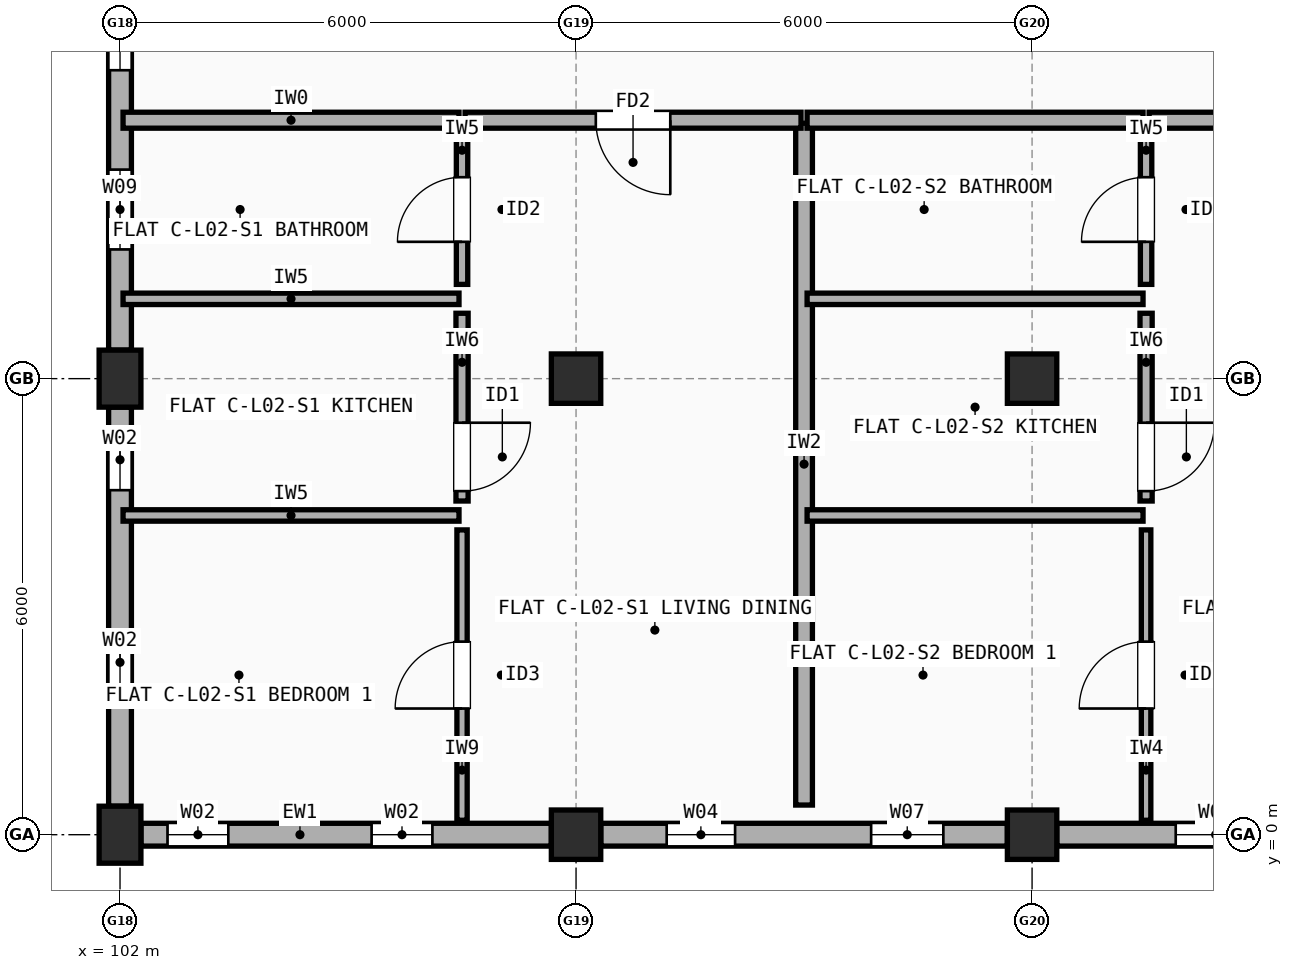
"""IFC4 building model, lengths in metres.
Left out: names, types, materials, properties, quantities, classifications, styles, units other than length and angle.
Written with IfcOpenShell. Run it as: python <this file> out.ifc"""

import sys

from ifc_helpers import new_model, si_unit, direction, frame, frame_2d, origin, origin_2d, place, context, subcontext, project, spatial, rectangle, extrude, element, fill, save


model = new_model("IFC4")
c1 = context("Model", 3, precision=1e-05, world=origin(), true_north=direction((0.0, 1.0)))
c2 = subcontext(c1, "Body", "Model", "MODEL_VIEW")
j1 = project(units=[si_unit("LENGTHUNIT", "METRE"), si_unit("PLANEANGLEUNIT", "RADIAN")], contexts=[c1])
p1 = place(None, origin())
s1 = spatial("IfcSite", under=j1, at=p1, CompositionType="ELEMENT")
p2 = place(p1, origin())
s2 = spatial("IfcBuilding", under=s1, at=p2, CompositionType="ELEMENT")
p3 = place(p2, frame((0.0, 0.0, 7.7)))
s3 = spatial("IfcBuildingStorey", under=s2, at=p3, CompositionType="ELEMENT", Elevation=7.7)
for number, where, z_axis, x_axis in (
    (1, (102.0, 0.0, 0.0), (0.0, 0.0, 1.0), (1.0, 0.0, 0.0)),
    (2, (102.0, 6.0, 0.0), (0.0, 0.0, 1.0), (1.0, 0.0, 0.0)),
):
    element("IfcColumn", number, at=place(p3, frame(where, z_axis=z_axis, x_axis=x_axis)), inside=s3, PredefinedType="COLUMN", context=c2, shape_type="SweptSolid", body=[
        extrude(rectangle(XDim=0.55, YDim=0.75, at=origin_2d()), origin(), (0.0, 0.0, 1.0), 2.955),
    ])
for number, where, z_axis, x_axis in (
    (3, (108.0, 0.0, 0.0), (0.0, 0.0, 1.0), (1.0, 0.0, 0.0)),
    (4, (108.0, 6.0, 0.0), (0.0, 0.0, 1.0), (1.0, 0.0, 0.0)),
    (5, (114.0, 0.0, 0.0), (0.0, 0.0, 1.0), (1.0, 0.0, 0.0)),
    (6, (114.0, 6.0, 0.0), (0.0, 0.0, 1.0), (1.0, 0.0, 0.0)),
):
    element("IfcColumn", number, at=place(p3, frame(where, z_axis=z_axis, x_axis=x_axis)), inside=s3, PredefinedType="COLUMN", context=c2, shape_type="SweptSolid", body=[
        extrude(rectangle(XDim=0.65, YDim=0.65, at=origin_2d()), origin(), (0.0, 0.0, 1.0), 2.955),
    ])
p4 = place(p3, frame((102.275, 0.0, 0.0), z_axis=(0.0, 0.0, 1.0), x_axis=(1.0, 0.0, 0.0)))
e7 = element("IfcWall", 7, at=p4, inside=s3, PredefinedType="STANDARD", context=c2, shape_type="SweptSolid", body=[
    extrude(rectangle(XDim=5.4, YDim=0.3, at=frame_2d((2.7, 0.0))), origin(), (0.0, 0.0, 1.0), 2.437),
])
p5 = place(p4, frame((0.35, 0.0, 0.9)))
e8 = element("IfcOpeningElement", 8, at=p5, cuts=e7, PredefinedType="OPENING", context=c2, shape_type="SweptSolid", body=[
    extrude(rectangle(XDim=0.8, YDim=1.2, at=frame_2d((0.4, 0.6))), frame((0.0, 0.16, 0.0), z_axis=(0.0, -1.0, 0.0), x_axis=(1.0, 0.0, 0.0)), (0.0, 0.0, 1.0), 0.32),
])
p6 = place(p4, frame((3.035, 0.0, 0.9)))
e9 = element("IfcOpeningElement", 9, at=p6, cuts=e7, PredefinedType="OPENING", context=c2, shape_type="SweptSolid", body=[
    extrude(rectangle(XDim=0.8, YDim=1.2, at=frame_2d((0.4, 0.6))), frame((0.0, 0.16, 0.0), z_axis=(0.0, -1.0, 0.0), x_axis=(1.0, 0.0, 0.0)), (0.0, 0.0, 1.0), 0.32),
])
p7 = place(p3, frame((108.325, 0.0, 0.0), z_axis=(0.0, 0.0, 1.0), x_axis=(1.0, 0.0, 0.0)))
e10 = element("IfcWall", 10, at=p7, inside=s3, PredefinedType="STANDARD", context=c2, shape_type="SweptSolid", body=[
    extrude(rectangle(XDim=5.35, YDim=0.3, at=frame_2d((2.675, 0.0))), origin(), (0.0, 0.0, 1.0), 2.437),
])
p8 = place(p7, frame((0.867, 0.0, 0.9)))
e11 = element("IfcOpeningElement", 11, at=p8, cuts=e10, PredefinedType="OPENING", context=c2, shape_type="SweptSolid", body=[
    extrude(rectangle(XDim=0.9, YDim=1.3, at=frame_2d((0.45, 0.65))), frame((0.0, 0.16, 0.0), z_axis=(0.0, -1.0, 0.0), x_axis=(1.0, 0.0, 0.0)), (0.0, 0.0, 1.0), 0.32),
])
p9 = place(p7, frame((3.558, 0.0, 0.9)))
e12 = element("IfcOpeningElement", 12, at=p9, cuts=e10, PredefinedType="OPENING", context=c2, shape_type="SweptSolid", body=[
    extrude(rectangle(XDim=0.95, YDim=1.35, at=frame_2d((0.475, 0.675))), frame((0.0, 0.16, 0.0), z_axis=(0.0, -1.0, 0.0), x_axis=(1.0, 0.0, 0.0)), (0.0, 0.0, 1.0), 0.32),
])
p10 = place(p3, frame((114.325, 0.0, 0.0), z_axis=(0.0, 0.0, 1.0), x_axis=(1.0, 0.0, 0.0)))
e13 = element("IfcWall", 13, at=p10, inside=s3, PredefinedType="STANDARD", context=c2, shape_type="SweptSolid", body=[
    extrude(rectangle(XDim=5.35, YDim=0.3, at=frame_2d((2.675, 0.0))), origin(), (0.0, 0.0, 1.0), 2.437),
])
p11 = place(p10, frame((1.565, 0.0, 0.9)))
e14 = element("IfcOpeningElement", 14, at=p11, cuts=e13, PredefinedType="OPENING", context=c2, shape_type="SweptSolid", body=[
    extrude(rectangle(XDim=1.05, YDim=1.35, at=frame_2d((0.525, 0.675))), frame((0.0, 0.16, 0.0), z_axis=(0.0, -1.0, 0.0), x_axis=(1.0, 0.0, 0.0)), (0.0, 0.0, 1.0), 0.32),
])
p12 = place(p10, frame((3.95, 0.0, 0.9)))
e15 = element("IfcOpeningElement", 15, at=p12, cuts=e13, PredefinedType="OPENING", context=c2, shape_type="SweptSolid", body=[
    extrude(rectangle(XDim=1.05, YDim=1.35, at=frame_2d((0.525, 0.675))), frame((0.0, 0.16, 0.0), z_axis=(0.0, -1.0, 0.0), x_axis=(1.0, 0.0, 0.0)), (0.0, 0.0, 1.0), 0.32),
])
p13 = place(p3, frame((102.0, 11.625, 0.0), z_axis=(0.0, 0.0, 1.0), x_axis=(0.0, -1.0, 0.0)))
e16 = element("IfcWall", 16, at=p13, inside=s3, PredefinedType="STANDARD", context=c2, shape_type="SweptSolid", body=[
    extrude(rectangle(XDim=5.25, YDim=0.3, at=frame_2d((2.625, 0.0))), origin(), (0.0, 0.0, 1.0), 2.437),
])
p14 = place(p13, frame((0.617, 0.0, 0.9)))
e17 = element("IfcOpeningElement", 17, at=p14, cuts=e16, PredefinedType="OPENING", context=c2, shape_type="SweptSolid", body=[
    extrude(rectangle(XDim=0.95, YDim=1.35, at=frame_2d((0.475, 0.675))), frame((0.0, 0.16, 0.0), z_axis=(0.0, -1.0, 0.0), x_axis=(1.0, 0.0, 0.0)), (0.0, 0.0, 1.0), 0.32),
])
p15 = place(p13, frame((2.875, 0.0, 0.9)))
e18 = element("IfcOpeningElement", 18, at=p15, cuts=e16, PredefinedType="OPENING", context=c2, shape_type="SweptSolid", body=[
    extrude(rectangle(XDim=1.05, YDim=1.35, at=frame_2d((0.525, 0.675))), frame((0.0, 0.16, 0.0), z_axis=(0.0, -1.0, 0.0), x_axis=(1.0, 0.0, 0.0)), (0.0, 0.0, 1.0), 0.32),
])
p16 = place(p3, frame((102.0, 5.625, 0.0), z_axis=(0.0, 0.0, 1.0), x_axis=(0.0, -1.0, 0.0)))
e19 = element("IfcWall", 19, at=p16, inside=s3, PredefinedType="STANDARD", context=c2, shape_type="SweptSolid", body=[
    extrude(rectangle(XDim=5.25, YDim=0.3, at=frame_2d((2.625, 0.0))), origin(), (0.0, 0.0, 1.0), 2.437),
])
p17 = place(p16, frame((0.292, 0.0, 0.9)))
e20 = element("IfcOpeningElement", 20, at=p17, cuts=e19, PredefinedType="OPENING", context=c2, shape_type="SweptSolid", body=[
    extrude(rectangle(XDim=0.8, YDim=1.2, at=frame_2d((0.4, 0.6))), frame((0.0, 0.16, 0.0), z_axis=(0.0, -1.0, 0.0), x_axis=(1.0, 0.0, 0.0)), (0.0, 0.0, 1.0), 0.32),
])
p18 = place(p16, frame((2.958, 0.0, 0.9)))
e21 = element("IfcOpeningElement", 21, at=p18, cuts=e19, PredefinedType="OPENING", context=c2, shape_type="SweptSolid", body=[
    extrude(rectangle(XDim=0.8, YDim=1.2, at=frame_2d((0.4, 0.6))), frame((0.0, 0.16, 0.0), z_axis=(0.0, -1.0, 0.0), x_axis=(1.0, 0.0, 0.0)), (0.0, 0.0, 1.0), 0.32),
])
p19 = place(p3, frame((111.0, 0.39, 0.0), z_axis=(0.0, 0.0, 1.0), x_axis=(0.0, 1.0, 0.0)))
e22 = element("IfcWall", 22, at=p19, inside=s3, PredefinedType="SOLIDWALL", context=c2, shape_type="SweptSolid", body=[
    extrude(rectangle(XDim=8.97, YDim=0.22, at=frame_2d((4.485, 0.0))), origin(), (0.0, 0.0, 1.0), 2.437),
])
p20 = place(p3, frame((102.04, 9.4, 0.0), z_axis=(0.0, 0.0, 1.0), x_axis=(1.0, 0.0, 0.0)))
e23 = element("IfcWall", 23, at=p20, inside=s3, PredefinedType="SOLIDWALL", context=c2, shape_type="SweptSolid", body=[
    extrude(rectangle(XDim=4.42, YDim=0.21, at=frame_2d((2.21, 0.0))), origin(), (0.0, 0.0, 1.0), 2.437),
])
p21 = place(p3, frame((106.54, 9.4, 0.0), z_axis=(0.0, 0.0, 1.0), x_axis=(1.0, 0.0, 0.0)))
e24 = element("IfcWall", 24, at=p21, inside=s3, PredefinedType="SOLIDWALL", context=c2, shape_type="SweptSolid", body=[
    extrude(rectangle(XDim=4.42, YDim=0.21, at=frame_2d((2.21, 0.0))), origin(), (0.0, 0.0, 1.0), 2.337),
])
p22 = place(p21, frame((1.72, 0.0, 0.0)))
e25 = element("IfcOpeningElement", 25, at=p22, cuts=e24, PredefinedType="OPENING", context=c2, shape_type="SweptSolid", body=[
    extrude(rectangle(XDim=0.98, YDim=2.15, at=frame_2d((0.49, 1.075))), frame((0.0, 0.115, 0.0), z_axis=(0.0, -1.0, 0.0), x_axis=(1.0, 0.0, 0.0)), (0.0, 0.0, 1.0), 0.23),
])
p23 = place(p3, frame((106.5, 0.19, 0.0), z_axis=(0.0, 0.0, 1.0), x_axis=(0.0, 1.0, 0.0)))
e26 = element("IfcWall", 26, at=p23, inside=s3, PredefinedType="PARTITIONING", context=c2, shape_type="SweptSolid", body=[
    extrude(rectangle(XDim=3.82, YDim=0.135, at=frame_2d((1.91, 0.0))), origin(), (0.0, 0.0, 1.0), 2.955),
])
p24 = place(p23, frame((1.47, 0.0, 0.0)))
e27 = element("IfcOpeningElement", 27, at=p24, cuts=e26, PredefinedType="OPENING", context=c2, shape_type="SweptSolid", body=[
    extrude(rectangle(XDim=0.88, YDim=2.1, at=frame_2d((0.44, 1.05))), frame((0.0, 0.077, 0.0), z_axis=(0.0, -1.0, 0.0), x_axis=(1.0, 0.0, 0.0)), (0.0, 0.0, 1.0), 0.155),
])
p25 = place(p3, frame((106.5, 4.39, 0.0), z_axis=(0.0, 0.0, 1.0), x_axis=(0.0, 1.0, 0.0)))
e28 = element("IfcWall", 28, at=p25, inside=s3, PredefinedType="PLUMBINGWALL", context=c2, shape_type="SweptSolid", body=[
    extrude(rectangle(XDim=2.47, YDim=0.16, at=frame_2d((1.235, 0.0))), origin(), (0.0, 0.0, 1.0), 2.437),
])
p26 = place(p25, frame((0.13, 0.0, 0.0)))
e29 = element("IfcOpeningElement", 29, at=p26, cuts=e28, PredefinedType="OPENING", context=c2, shape_type="SweptSolid", body=[
    extrude(rectangle(XDim=0.9, YDim=2.1, at=frame_2d((0.45, 1.05))), frame((0.0, 0.09, 0.0), z_axis=(0.0, -1.0, 0.0), x_axis=(1.0, 0.0, 0.0)), (0.0, 0.0, 1.0), 0.18),
])
p27 = place(p3, frame((106.5, 7.24, 0.0), z_axis=(0.0, 0.0, 1.0), x_axis=(0.0, 1.0, 0.0)))
e30 = element("IfcWall", 30, at=p27, inside=s3, PredefinedType="PARTITIONING", context=c2, shape_type="SweptSolid", body=[
    extrude(rectangle(XDim=1.97, YDim=0.15, at=frame_2d((0.985, 0.0))), origin(), (0.0, 0.0, 1.0), 2.955),
])
p28 = place(p27, frame((0.56, 0.0, 0.0)))
e31 = element("IfcOpeningElement", 31, at=p28, cuts=e30, PredefinedType="OPENING", context=c2, shape_type="SweptSolid", body=[
    extrude(rectangle(XDim=0.85, YDim=2.1, at=frame_2d((0.425, 1.05))), frame((0.0, 0.085, 0.0), z_axis=(0.0, -1.0, 0.0), x_axis=(1.0, 0.0, 0.0)), (0.0, 0.0, 1.0), 0.17),
])
for number, where, z_axis, x_axis in (
    (32, (102.04, 4.2, 0.0), (0.0, 0.0, 1.0), (1.0, 0.0, 0.0)),
    (33, (102.04, 7.05, 0.0), (0.0, 0.0, 1.0), (1.0, 0.0, 0.0)),
):
    element("IfcWall", number, at=place(p3, frame(where, z_axis=z_axis, x_axis=x_axis)), inside=s3, PredefinedType="PARTITIONING", context=c2, shape_type="SweptSolid", body=[
        extrude(rectangle(XDim=4.42, YDim=0.15, at=frame_2d((2.21, 0.0))), origin(), (0.0, 0.0, 1.0), 2.437),
    ])
p29 = place(p3, frame((111.04, 9.4, 0.0), z_axis=(0.0, 0.0, 1.0), x_axis=(1.0, 0.0, 0.0)))
e34 = element("IfcWall", 34, at=p29, inside=s3, PredefinedType="SOLIDWALL", context=c2, shape_type="SweptSolid", body=[
    extrude(rectangle(XDim=4.42, YDim=0.21, at=frame_2d((2.21, 0.0))), origin(), (0.0, 0.0, 1.0), 2.337),
])
p30 = place(p3, frame((115.54, 9.4, 0.0), z_axis=(0.0, 0.0, 1.0), x_axis=(1.0, 0.0, 0.0)))
e35 = element("IfcWall", 35, at=p30, inside=s3, PredefinedType="SOLIDWALL", context=c2, shape_type="SweptSolid", body=[
    extrude(rectangle(XDim=4.42, YDim=0.21, at=frame_2d((2.21, 0.0))), origin(), (0.0, 0.0, 1.0), 2.337),
])
p31 = place(p30, frame((1.685, 0.0, 0.0)))
e36 = element("IfcOpeningElement", 36, at=p31, cuts=e35, PredefinedType="OPENING", context=c2, shape_type="SweptSolid", body=[
    extrude(rectangle(XDim=1.05, YDim=2.15, at=frame_2d((0.525, 1.075))), frame((0.0, 0.115, 0.0), z_axis=(0.0, -1.0, 0.0), x_axis=(1.0, 0.0, 0.0)), (0.0, 0.0, 1.0), 0.23),
])
p32 = place(p3, frame((115.5, 0.19, 0.0), z_axis=(0.0, 0.0, 1.0), x_axis=(0.0, 1.0, 0.0)))
e37 = element("IfcWall", 37, at=p32, inside=s3, PredefinedType="PARTITIONING", context=c2, shape_type="SweptSolid", body=[
    extrude(rectangle(XDim=3.82, YDim=0.125, at=frame_2d((1.91, 0.0))), origin(), (0.0, 0.0, 1.0), 2.955),
])
p33 = place(p32, frame((1.47, 0.0, 0.0)))
e38 = element("IfcOpeningElement", 38, at=p33, cuts=e37, PredefinedType="OPENING", context=c2, shape_type="SweptSolid", body=[
    extrude(rectangle(XDim=0.88, YDim=2.1, at=frame_2d((0.44, 1.05))), frame((0.0, 0.073, 0.0), z_axis=(0.0, -1.0, 0.0), x_axis=(1.0, 0.0, 0.0)), (0.0, 0.0, 1.0), 0.145),
])
p34 = place(p3, frame((115.5, 4.39, 0.0), z_axis=(0.0, 0.0, 1.0), x_axis=(0.0, 1.0, 0.0)))
e39 = element("IfcWall", 39, at=p34, inside=s3, PredefinedType="PLUMBINGWALL", context=c2, shape_type="SweptSolid", body=[
    extrude(rectangle(XDim=2.47, YDim=0.16, at=frame_2d((1.235, 0.0))), origin(), (0.0, 0.0, 1.0), 2.437),
])
p35 = place(p34, frame((0.13, 0.0, 0.0)))
e40 = element("IfcOpeningElement", 40, at=p35, cuts=e39, PredefinedType="OPENING", context=c2, shape_type="SweptSolid", body=[
    extrude(rectangle(XDim=0.9, YDim=2.1, at=frame_2d((0.45, 1.05))), frame((0.0, 0.09, 0.0), z_axis=(0.0, -1.0, 0.0), x_axis=(1.0, 0.0, 0.0)), (0.0, 0.0, 1.0), 0.18),
])
p36 = place(p3, frame((115.5, 7.24, 0.0), z_axis=(0.0, 0.0, 1.0), x_axis=(0.0, 1.0, 0.0)))
e41 = element("IfcWall", 41, at=p36, inside=s3, PredefinedType="PARTITIONING", context=c2, shape_type="SweptSolid", body=[
    extrude(rectangle(XDim=1.97, YDim=0.15, at=frame_2d((0.985, 0.0))), origin(), (0.0, 0.0, 1.0), 2.955),
])
p37 = place(p36, frame((0.56, 0.0, 0.0)))
e42 = element("IfcOpeningElement", 42, at=p37, cuts=e41, PredefinedType="OPENING", context=c2, shape_type="SweptSolid", body=[
    extrude(rectangle(XDim=0.85, YDim=2.1, at=frame_2d((0.425, 1.05))), frame((0.0, 0.085, 0.0), z_axis=(0.0, -1.0, 0.0), x_axis=(1.0, 0.0, 0.0)), (0.0, 0.0, 1.0), 0.17),
])
for number, where, z_axis, x_axis in (
    (43, (111.04, 4.2, 0.0), (0.0, 0.0, 1.0), (1.0, 0.0, 0.0)),
    (44, (111.04, 7.05, 0.0), (0.0, 0.0, 1.0), (1.0, 0.0, 0.0)),
):
    element("IfcWall", number, at=place(p3, frame(where, z_axis=z_axis, x_axis=x_axis)), inside=s3, PredefinedType="PARTITIONING", context=c2, shape_type="SweptSolid", body=[
        extrude(rectangle(XDim=4.42, YDim=0.15, at=frame_2d((2.21, 0.0))), origin(), (0.0, 0.0, 1.0), 2.337),
    ])
p38 = place(p5, origin())
e45 = element("IfcWindow", 45, at=p38, inside=s3, PartitioningType="SINGLE_PANEL", PredefinedType="WINDOW", context=c2, shape_type="SweptSolid", body=[
    extrude(rectangle(XDim=0.8, YDim=1.2, at=frame_2d((0.4, 0.6))), frame((0.0, 0.03, 0.0), z_axis=(0.0, -1.0, 0.0), x_axis=(1.0, 0.0, 0.0)), (0.0, 0.0, 1.0), 0.06),
])
fill(e8, e45)
p39 = place(p6, origin())
e46 = element("IfcWindow", 46, at=p39, inside=s3, PartitioningType="SINGLE_PANEL", PredefinedType="WINDOW", context=c2, shape_type="SweptSolid", body=[
    extrude(rectangle(XDim=0.8, YDim=1.2, at=frame_2d((0.4, 0.6))), frame((0.0, 0.03, 0.0), z_axis=(0.0, -1.0, 0.0), x_axis=(1.0, 0.0, 0.0)), (0.0, 0.0, 1.0), 0.06),
])
fill(e9, e46)
p40 = place(p8, origin())
e47 = element("IfcWindow", 47, at=p40, inside=s3, PartitioningType="SINGLE_PANEL", PredefinedType="WINDOW", context=c2, shape_type="SweptSolid", body=[
    extrude(rectangle(XDim=0.9, YDim=1.3, at=frame_2d((0.45, 0.65))), frame((0.0, 0.03, 0.0), z_axis=(0.0, -1.0, 0.0), x_axis=(1.0, 0.0, 0.0)), (0.0, 0.0, 1.0), 0.06),
])
fill(e11, e47)
p41 = place(p9, origin())
e48 = element("IfcWindow", 48, at=p41, inside=s3, PartitioningType="SINGLE_PANEL", PredefinedType="WINDOW", context=c2, shape_type="SweptSolid", body=[
    extrude(rectangle(XDim=0.95, YDim=1.35, at=frame_2d((0.475, 0.675))), frame((0.0, 0.03, 0.0), z_axis=(0.0, -1.0, 0.0), x_axis=(1.0, 0.0, 0.0)), (0.0, 0.0, 1.0), 0.06),
])
fill(e12, e48)
p42 = place(p11, origin())
e49 = element("IfcWindow", 49, at=p42, inside=s3, PartitioningType="SINGLE_PANEL", PredefinedType="WINDOW", context=c2, shape_type="SweptSolid", body=[
    extrude(rectangle(XDim=1.05, YDim=1.35, at=frame_2d((0.525, 0.675))), frame((0.0, 0.03, 0.0), z_axis=(0.0, -1.0, 0.0), x_axis=(1.0, 0.0, 0.0)), (0.0, 0.0, 1.0), 0.06),
])
fill(e14, e49)
p43 = place(p14, origin())
e50 = element("IfcWindow", 50, at=p43, inside=s3, PartitioningType="SINGLE_PANEL", PredefinedType="WINDOW", context=c2, shape_type="SweptSolid", body=[
    extrude(rectangle(XDim=0.95, YDim=1.35, at=frame_2d((0.475, 0.675))), frame((0.0, 0.03, 0.0), z_axis=(0.0, -1.0, 0.0), x_axis=(1.0, 0.0, 0.0)), (0.0, 0.0, 1.0), 0.06),
])
fill(e17, e50)
p44 = place(p15, origin())
e51 = element("IfcWindow", 51, at=p44, inside=s3, PartitioningType="SINGLE_PANEL", PredefinedType="WINDOW", context=c2, shape_type="SweptSolid", body=[
    extrude(rectangle(XDim=1.05, YDim=1.35, at=frame_2d((0.525, 0.675))), frame((0.0, 0.03, 0.0), z_axis=(0.0, -1.0, 0.0), x_axis=(1.0, 0.0, 0.0)), (0.0, 0.0, 1.0), 0.06),
])
fill(e18, e51)
p45 = place(p17, origin())
e52 = element("IfcWindow", 52, at=p45, inside=s3, PartitioningType="SINGLE_PANEL", PredefinedType="WINDOW", context=c2, shape_type="SweptSolid", body=[
    extrude(rectangle(XDim=0.8, YDim=1.2, at=frame_2d((0.4, 0.6))), frame((0.0, 0.03, 0.0), z_axis=(0.0, -1.0, 0.0), x_axis=(1.0, 0.0, 0.0)), (0.0, 0.0, 1.0), 0.06),
])
fill(e20, e52)
p46 = place(p18, origin())
e53 = element("IfcWindow", 53, at=p46, inside=s3, PartitioningType="SINGLE_PANEL", PredefinedType="WINDOW", context=c2, shape_type="SweptSolid", body=[
    extrude(rectangle(XDim=0.8, YDim=1.2, at=frame_2d((0.4, 0.6))), frame((0.0, 0.03, 0.0), z_axis=(0.0, -1.0, 0.0), x_axis=(1.0, 0.0, 0.0)), (0.0, 0.0, 1.0), 0.06),
])
fill(e21, e53)
p47 = place(p22, origin())
e54 = element("IfcDoor", 54, at=p47, inside=s3, OperationType="SINGLE_SWING_RIGHT", PredefinedType="DOOR", context=c2, shape_type="SweptSolid", body=[
    extrude(rectangle(XDim=0.98, YDim=2.15, at=frame_2d((0.49, 1.075))), frame((0.0, 0.025, 0.0), z_axis=(0.0, -1.0, 0.0), x_axis=(1.0, 0.0, 0.0)), (0.0, 0.0, 1.0), 0.05),
])
fill(e25, e54)
p48 = place(p24, origin())
e55 = element("IfcDoor", 55, at=p48, inside=s3, OperationType="SINGLE_SWING_LEFT", PredefinedType="DOOR", context=c2, shape_type="SweptSolid", body=[
    extrude(rectangle(XDim=0.88, YDim=2.1, at=frame_2d((0.44, 1.05))), frame((0.0, 0.025, 0.0), z_axis=(0.0, -1.0, 0.0), x_axis=(1.0, 0.0, 0.0)), (0.0, 0.0, 1.0), 0.05),
])
fill(e27, e55)
p49 = place(p26, origin())
e56 = element("IfcDoor", 56, at=p49, inside=s3, OperationType="SINGLE_SWING_RIGHT", PredefinedType="DOOR", context=c2, shape_type="SweptSolid", body=[
    extrude(rectangle(XDim=0.9, YDim=2.1, at=frame_2d((0.45, 1.05))), frame((0.0, 0.025, 0.0), z_axis=(0.0, -1.0, 0.0), x_axis=(1.0, 0.0, 0.0)), (0.0, 0.0, 1.0), 0.05),
])
fill(e29, e56)
p50 = place(p28, origin())
e57 = element("IfcDoor", 57, at=p50, inside=s3, OperationType="SINGLE_SWING_LEFT", PredefinedType="DOOR", context=c2, shape_type="SweptSolid", body=[
    extrude(rectangle(XDim=0.85, YDim=2.1, at=frame_2d((0.425, 1.05))), frame((0.0, 0.025, 0.0), z_axis=(0.0, -1.0, 0.0), x_axis=(1.0, 0.0, 0.0)), (0.0, 0.0, 1.0), 0.05),
])
fill(e31, e57)
p51 = place(p33, origin())
e58 = element("IfcDoor", 58, at=p51, inside=s3, OperationType="SINGLE_SWING_LEFT", PredefinedType="DOOR", context=c2, shape_type="SweptSolid", body=[
    extrude(rectangle(XDim=0.88, YDim=2.1, at=frame_2d((0.44, 1.05))), frame((0.0, 0.025, 0.0), z_axis=(0.0, -1.0, 0.0), x_axis=(1.0, 0.0, 0.0)), (0.0, 0.0, 1.0), 0.05),
])
fill(e38, e58)
p52 = place(p35, origin())
e59 = element("IfcDoor", 59, at=p52, inside=s3, OperationType="SINGLE_SWING_RIGHT", PredefinedType="DOOR", context=c2, shape_type="SweptSolid", body=[
    extrude(rectangle(XDim=0.9, YDim=2.1, at=frame_2d((0.45, 1.05))), frame((0.0, 0.025, 0.0), z_axis=(0.0, -1.0, 0.0), x_axis=(1.0, 0.0, 0.0)), (0.0, 0.0, 1.0), 0.05),
])
fill(e40, e59)
p53 = place(p37, origin())
e60 = element("IfcDoor", 60, at=p53, inside=s3, OperationType="SINGLE_SWING_LEFT", PredefinedType="DOOR", context=c2, shape_type="SweptSolid", body=[
    extrude(rectangle(XDim=0.85, YDim=2.1, at=frame_2d((0.425, 1.05))), frame((0.0, 0.025, 0.0), z_axis=(0.0, -1.0, 0.0), x_axis=(1.0, 0.0, 0.0)), (0.0, 0.0, 1.0), 0.05),
])
fill(e42, e60)
save(model, sys.argv[1])
